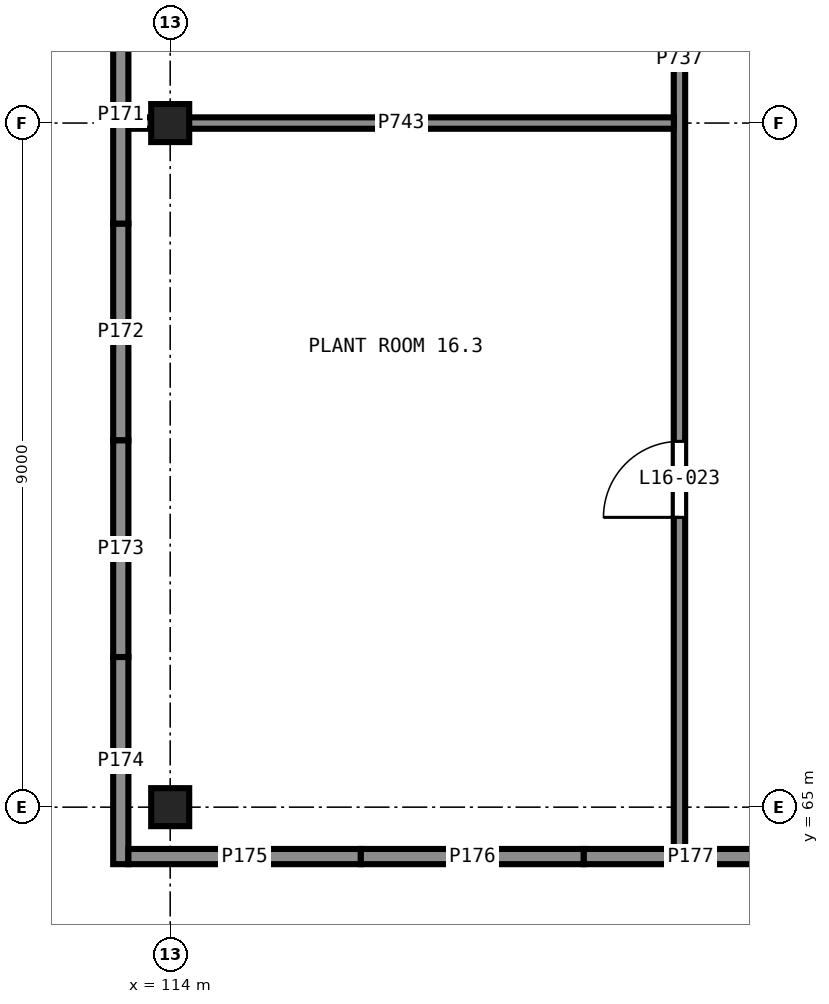
"""IFC4 building model, lengths in metres.
Left out: names, types, materials, properties, quantities, classifications, styles, units other than length and angle.
Written with IfcOpenShell. Run it as: python <this file> out.ifc"""

import sys

from ifc_helpers import new_model, si_unit, direction, frame, frame_2d, origin, origin_2d, place, context, subcontext, project, spatial, rectangle, extrude, element, fill, save


model = new_model("IFC4")
c1 = context("Model", 3, precision=1e-05, world=origin(), true_north=direction((0.0, 1.0)))
c2 = subcontext(c1, "Body", "Model", "MODEL_VIEW")
j1 = project(units=[si_unit("LENGTHUNIT", "METRE"), si_unit("PLANEANGLEUNIT", "RADIAN")], contexts=[c1])
p1 = place(None, origin())
s1 = spatial("IfcSite", under=j1, at=p1, CompositionType="ELEMENT")
p2 = place(p1, origin())
s2 = spatial("IfcBuilding", under=s1, at=p2, CompositionType="ELEMENT")
p3 = place(p2, frame((0.0, 0.0, 65.5)))
s3 = spatial("IfcBuildingStorey", under=s2, at=p3, CompositionType="ELEMENT", Elevation=65.5)
for number, where, z_axis, x_axis in (
    (1, (114.0, 65.0, 0.0), (0.0, 0.0, 1.0), (1.0, 0.0, 0.0)),
    (2, (114.0, 74.0, 0.0), (0.0, 0.0, 1.0), (1.0, 0.0, 0.0)),
):
    element("IfcColumn", number, at=place(p3, frame(where, z_axis=z_axis, x_axis=x_axis)), inside=s3, PredefinedType="COLUMN", context=c2, shape_type="SweptSolid", body=[
        extrude(rectangle(XDim=0.5, YDim=0.5, at=origin_2d()), origin(), (0.0, 0.0, 1.0), 4.7),
    ])
p4 = place(p3, frame((113.35, 75.525, 0.0), z_axis=(0.0, 0.0, 1.0), x_axis=(0.0, -1.0, 0.0)))
e3 = element("IfcWall", 3, at=p4, inside=s3, PredefinedType="SOLIDWALL", context=c2, shape_type="SweptSolid", body=[
    extrude(rectangle(XDim=2.85, YDim=0.2, at=frame_2d((1.425, 0.0))), origin(), (0.0, 0.0, 1.0), 4.7),
])
p5 = place(p3, frame((113.35, 72.675, 0.0), z_axis=(0.0, 0.0, 1.0), x_axis=(0.0, -1.0, 0.0)))
e4 = element("IfcWall", 4, at=p5, inside=s3, PredefinedType="SOLIDWALL", context=c2, shape_type="SweptSolid", body=[
    extrude(rectangle(XDim=2.85, YDim=0.2, at=frame_2d((1.425, 0.0))), origin(), (0.0, 0.0, 1.0), 4.7),
])
p6 = place(p3, frame((113.35, 69.825, 0.0), z_axis=(0.0, 0.0, 1.0), x_axis=(0.0, -1.0, 0.0)))
e5 = element("IfcWall", 5, at=p6, inside=s3, PredefinedType="SOLIDWALL", context=c2, shape_type="SweptSolid", body=[
    extrude(rectangle(XDim=2.85, YDim=0.2, at=frame_2d((1.425, 0.0))), origin(), (0.0, 0.0, 1.0), 4.7),
])
p7 = place(p3, frame((113.35, 66.975, 0.0), z_axis=(0.0, 0.0, 1.0), x_axis=(0.0, -1.0, 0.0)))
e6 = element("IfcWall", 6, at=p7, inside=s3, PredefinedType="SOLIDWALL", context=c2, shape_type="SweptSolid", body=[
    extrude(rectangle(XDim=2.725, YDim=0.2, at=frame_2d((1.363, 0.0))), origin(), (0.0, 0.0, 1.0), 4.7),
])
p8 = place(p3, frame((113.45, 64.35, 0.0), z_axis=(0.0, 0.0, 1.0), x_axis=(1.0, 0.0, 0.0)))
e7 = element("IfcWall", 7, at=p8, inside=s3, PredefinedType="SOLIDWALL", context=c2, shape_type="SweptSolid", body=[
    extrude(rectangle(XDim=3.058, YDim=0.2, at=frame_2d((1.529, 0.0))), origin(), (0.0, 0.0, 1.0), 4.7),
])
p9 = place(p3, frame((116.508, 64.35, 0.0), z_axis=(0.0, 0.0, 1.0), x_axis=(1.0, 0.0, 0.0)))
e8 = element("IfcWall", 8, at=p9, inside=s3, PredefinedType="SOLIDWALL", context=c2, shape_type="SweptSolid", body=[
    extrude(rectangle(XDim=2.933, YDim=0.2, at=frame_2d((1.467, 0.0))), origin(), (0.0, 0.0, 1.0), 4.7),
])
p10 = place(p3, frame((119.442, 64.35, 0.0), z_axis=(0.0, 0.0, 1.0), x_axis=(1.0, 0.0, 0.0)))
e9 = element("IfcWall", 9, at=p10, inside=s3, PredefinedType="SOLIDWALL", context=c2, shape_type="SweptSolid", body=[
    extrude(rectangle(XDim=2.808, YDim=0.2, at=frame_2d((1.404, 0.0))), origin(), (0.0, 0.0, 1.0), 4.7),
])
p11 = place(p3, frame((120.7, 64.45, 0.0), z_axis=(0.0, 0.0, 1.0), x_axis=(0.0, 1.0, 0.0)))
e10 = element("IfcWall", 10, at=p11, inside=s3, PredefinedType="PARTITIONING", context=c2, shape_type="SweptSolid", body=[
    extrude(rectangle(XDim=20.775, YDim=0.15, at=frame_2d((10.388, 0.0))), origin(), (0.0, 0.0, 1.0), 4.7),
])
p12 = place(p11, frame((4.363, 0.0, 0.0)))
e11 = element("IfcOpeningElement", 11, at=p12, cuts=e10, PredefinedType="OPENING", context=c2, shape_type="SweptSolid", body=[
    extrude(rectangle(XDim=1.0, YDim=2.1, at=frame_2d((0.5, 1.05))), frame((0.0, 0.085, 0.0), z_axis=(0.0, -1.0, 0.0), x_axis=(1.0, 0.0, 0.0)), (0.0, 0.0, 1.0), 0.17),
])
p13 = place(p11, frame((14.685, 0.0, 0.0)))
e12 = element("IfcOpeningElement", 12, at=p13, cuts=e10, PredefinedType="OPENING", context=c2, shape_type="SweptSolid", body=[
    extrude(rectangle(XDim=1.0, YDim=2.1, at=frame_2d((0.5, 1.05))), frame((0.0, 0.085, 0.0), z_axis=(0.0, -1.0, 0.0), x_axis=(1.0, 0.0, 0.0)), (0.0, 0.0, 1.0), 0.17),
])
p14 = place(p3, frame((113.449, 74.0, 0.0), z_axis=(0.0, 0.0, 1.0), x_axis=(1.0, 0.0, 0.0)))
e13 = element("IfcWall", 13, at=p14, inside=s3, PredefinedType="PARTITIONING", context=c2, shape_type="SweptSolid", body=[
    extrude(rectangle(XDim=7.177, YDim=0.15, at=frame_2d((3.588, 0.0))), origin(), (0.0, 0.0, 1.0), 3.8),
])
p15 = place(p12, origin())
e14 = element("IfcDoor", 14, at=p15, inside=s3, OperationType="SINGLE_SWING_RIGHT", PredefinedType="DOOR", context=c2, shape_type="SweptSolid", body=[
    extrude(rectangle(XDim=1.0, YDim=2.1, at=frame_2d((0.5, 1.05))), frame((0.0, 0.025, 0.0), z_axis=(0.0, -1.0, 0.0), x_axis=(1.0, 0.0, 0.0)), (0.0, 0.0, 1.0), 0.05),
])
fill(e11, e14)
save(model, sys.argv[1])
